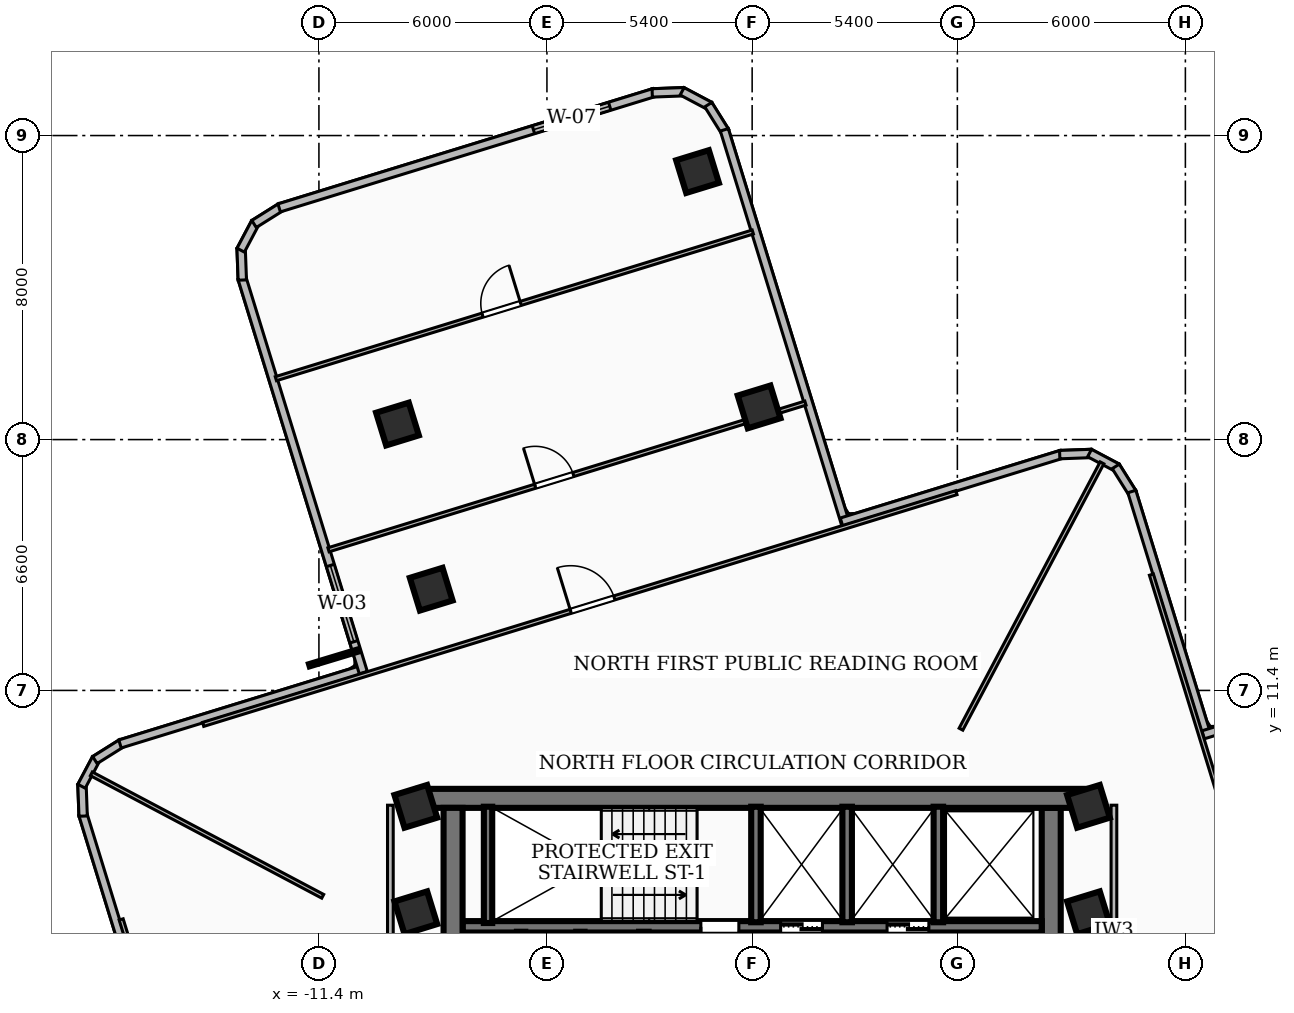
"""IFC4 building model, lengths in metres.
Left out: names, types, materials, properties, quantities, classifications, styles, units other than length and angle.
Written with IfcOpenShell. Run it as: python <this file> out.ifc"""

import sys

from ifc_helpers import new_model, si_unit, direction, frame, frame_2d, origin, origin_2d, place, context, subcontext, project, spatial, rectangle, extrude, element, fill, save


model = new_model("IFC4")
c1 = context("Model", 3, precision=1e-05, world=origin(), true_north=direction((0.0, 1.0)))
c2 = subcontext(c1, "Body", "Model", "MODEL_VIEW")
j1 = project(units=[si_unit("LENGTHUNIT", "METRE"), si_unit("PLANEANGLEUNIT", "RADIAN")], contexts=[c1])
p1 = place(None, origin())
s1 = spatial("IfcSite", under=j1, at=p1, CompositionType="ELEMENT")
p2 = place(p1, origin())
s2 = spatial("IfcBuilding", under=s1, at=p2, CompositionType="ELEMENT")
p3 = place(p2, frame((0.0, 0.0, 148.68)))
s3 = spatial("IfcBuildingStorey", under=s2, at=p3, CompositionType="ELEMENT", Elevation=148.68)
p4 = place(p3, frame((-8.78, 8.56, 0.0), z_axis=(0.0, 0.0, 1.0), x_axis=(1.0, 0.0, 0.0)))
e1 = element("IfcWall", 1, at=p4, inside=s3, PredefinedType="SHEAR", context=c2, shape_type="SweptSolid", body=[
    extrude(rectangle(XDim=17.56, YDim=0.5, at=frame_2d((8.78, 0.0))), origin(), (0.0, 0.0, 1.0), 3.32),
])
for number, where, z_axis, x_axis in (
    (2, (-7.87, 2.0, 0.0), (0.0, 0.0, 1.0), (0.0, 1.0, 0.0)),
    (3, (7.87, 8.31, 0.0), (0.0, 0.0, 1.0), (0.0, -1.0, 0.0)),
):
    element("IfcWall", number, at=place(p3, frame(where, z_axis=z_axis, x_axis=x_axis)), inside=s3, PredefinedType="SHEAR", context=c2, shape_type="SweptSolid", body=[
        extrude(rectangle(XDim=6.31, YDim=0.5, at=frame_2d((3.155, 0.0))), origin(), (0.0, 0.0, 1.0), 3.32),
    ])
p5 = place(p3, frame((7.62, 5.18, 0.0), z_axis=(0.0, 0.0, 1.0), x_axis=(-1.0, 0.0, 0.0)))
e4 = element("IfcWall", 4, at=p5, inside=s3, PredefinedType="SOLIDWALL", context=c2, shape_type="SweptSolid", body=[
    extrude(rectangle(XDim=15.24, YDim=0.3, at=frame_2d((7.62, 0.0))), origin(), (0.0, 0.0, 1.0), 3.32),
])
p6 = place(p5, frame((5.77, 0.0, 0.0)))
e5 = element("IfcOpeningElement", 5, at=p6, cuts=e4, PredefinedType="OPENING", context=c2, shape_type="SweptSolid", body=[
    extrude(rectangle(XDim=1.1, YDim=2.15, at=frame_2d((0.55, 1.075))), frame((0.0, 0.16, 0.0), z_axis=(0.0, -1.0, 0.0), x_axis=(1.0, 0.0, 0.0)), (0.0, 0.0, 1.0), 0.32),
])
p7 = place(p5, frame((2.97, 0.0, 0.0)))
e6 = element("IfcOpeningElement", 6, at=p7, cuts=e4, PredefinedType="OPENING", context=c2, shape_type="SweptSolid", body=[
    extrude(rectangle(XDim=1.1, YDim=2.15, at=frame_2d((0.55, 1.075))), frame((0.0, 0.16, 0.0), z_axis=(0.0, -1.0, 0.0), x_axis=(1.0, 0.0, 0.0)), (0.0, 0.0, 1.0), 0.32),
])
p8 = place(p5, frame((7.97, 0.0, 0.0)))
e7 = element("IfcOpeningElement", 7, at=p8, cuts=e4, PredefinedType="OPENING", context=c2, shape_type="SweptSolid", body=[
    extrude(rectangle(XDim=1.0, YDim=2.1, at=frame_2d((0.5, 1.05))), frame((0.0, 0.16, 0.0), z_axis=(0.0, -1.0, 0.0), x_axis=(1.0, 0.0, 0.0)), (0.0, 0.0, 1.0), 0.32),
])
p9 = place(p3, frame((-6.95, 5.28, 0.0), z_axis=(0.0, 0.0, 1.0), x_axis=(0.0, 1.0, 0.0)))
e8 = element("IfcWall", 8, at=p9, inside=s3, PredefinedType="SOLIDWALL", context=c2, shape_type="SweptSolid", body=[
    extrude(rectangle(XDim=3.06, YDim=0.22, at=frame_2d((1.53, 0.0))), origin(), (0.0, 0.0, 1.0), 3.32),
])
for number, where, z_axis, x_axis in (
    (9, (0.1, 5.3, 0.0), (0.0, 0.0, 1.0), (0.0, 1.0, 0.0)),
    (10, (2.5, 5.3, 0.0), (0.0, 0.0, 1.0), (0.0, 1.0, 0.0)),
    (11, (4.9, 5.3, 0.0), (0.0, 0.0, 1.0), (0.0, 1.0, 0.0)),
):
    element("IfcWall", number, at=place(p3, frame(where, z_axis=z_axis, x_axis=x_axis)), inside=s3, PredefinedType="SOLIDWALL", context=c2, shape_type="SweptSolid", body=[
        extrude(rectangle(XDim=3.04, YDim=0.25, at=frame_2d((1.52, 0.0))), origin(), (0.0, 0.0, 1.0), 3.32),
    ])
p10 = place(p3, frame((-2.85, 1.98, 0.0), z_axis=(0.0, 0.0, 1.0), x_axis=(0.0, 1.0, 0.0)))
e12 = element("IfcWall", 12, at=p10, inside=s3, PredefinedType="SOLIDWALL", context=c2, shape_type="SweptSolid", body=[
    extrude(rectangle(XDim=3.07, YDim=0.25, at=frame_2d((1.535, 0.0))), origin(), (0.0, 0.0, 1.0), 3.32),
])
for number, where, z_axis, x_axis in (
    (13, (-6.08, 1.98, 0.0), (0.0, 0.0, 1.0), (0.0, 1.0, 0.0)),
    (14, (-4.52, 1.98, 0.0), (0.0, 0.0, 1.0), (0.0, 1.0, 0.0)),
):
    element("IfcWall", number, at=place(p3, frame(where, z_axis=z_axis, x_axis=x_axis)), inside=s3, PredefinedType="SOLIDWALL", context=c2, shape_type="SweptSolid", body=[
        extrude(rectangle(XDim=3.07, YDim=0.22, at=frame_2d((1.535, 0.0))), origin(), (0.0, 0.0, 1.0), 3.32),
    ])
for number, where, z_axis, x_axis in (
    (15, (-8.85, 5.55, 0.0), (0.0, 0.0, 1.0), (0.956, 0.294, 0.0)),
    (16, (8.85, 5.55, 0.0), (0.0, 0.0, 1.0), (0.956, 0.294, 0.0)),
    (17, (-8.85, 8.35, 0.0), (0.0, 0.0, 1.0), (0.956, 0.294, 0.0)),
    (18, (8.85, 8.35, 0.0), (0.0, 0.0, 1.0), (0.956, 0.294, 0.0)),
    (19, (0.183, 18.86, 0.0), (0.0, 0.0, 1.0), (0.956, 0.294, 0.0)),
    (20, (-8.445, 14.064, 0.0), (0.0, 0.0, 1.0), (0.956, 0.294, 0.0)),
    (21, (-1.437, 25.052, 0.0), (0.0, 0.0, 1.0), (0.956, 0.294, 0.0)),
    (22, (-9.333, 18.409, 0.0), (0.0, 0.0, 1.0), (0.956, 0.294, 0.0)),
):
    element("IfcColumn", number, at=place(p3, frame(where, z_axis=z_axis, x_axis=x_axis)), inside=s3, PredefinedType="COLUMN", context=c2, shape_type="SweptSolid", body=[
        extrude(rectangle(XDim=0.9, YDim=0.9, at=origin_2d()), origin(), (0.0, 0.0, 1.0), 3.6),
    ])
p11 = place(p3, frame((-15.831, 2.351, 0.0), z_axis=(0.0, 0.0, 1.0), x_axis=(-0.293958424126, 0.955818207028, 0.0)))
e23 = element("IfcWall", 23, at=p11, inside=s3, PredefinedType="SOLIDWALL", context=c2, shape_type="SweptSolid", body=[
    extrude(rectangle(XDim=6.059, YDim=0.22, at=frame_2d((3.029, 0.0))), origin(), (0.0, 0.0, 1.0), 3.32),
])
p12 = place(p3, frame((-17.604, 8.093, 0.0), z_axis=(0.0, 0.0, 1.0), x_axis=(-0.037195813461, 0.999307996296, 0.0)))
e24 = element("IfcWall", 24, at=p12, inside=s3, PredefinedType="SOLIDWALL", context=c2, shape_type="SweptSolid", body=[
    extrude(rectangle(XDim=0.833, YDim=0.22, at=frame_2d((0.417, 0.0))), origin(), (0.0, 0.0, 1.0), 3.32),
])
p13 = place(p3, frame((-17.646, 8.879, 0.0), z_axis=(0.0, 0.0, 1.0), x_axis=(0.46853080902, 0.883447158012, 0.0)))
e25 = element("IfcWall", 25, at=p13, inside=s3, PredefinedType="SOLIDWALL", context=c2, shape_type="SweptSolid", body=[
    extrude(rectangle(XDim=0.82, YDim=0.22, at=frame_2d((0.41, 0.0))), origin(), (0.0, 0.0, 1.0), 3.32),
])
p14 = place(p3, frame((-17.295, 9.568, 0.0), z_axis=(0.0, 0.0, 1.0), x_axis=(0.847058721529, 0.531499315411, 0.0)))
e26 = element("IfcWall", 26, at=p14, inside=s3, PredefinedType="SOLIDWALL", context=c2, shape_type="SweptSolid", body=[
    extrude(rectangle(XDim=0.833, YDim=0.22, at=frame_2d((0.417, 0.0))), origin(), (0.0, 0.0, 1.0), 3.32),
])
p15 = place(p3, frame((-16.634, 9.991, 0.0), z_axis=(0.0, 0.0, 1.0), x_axis=(0.955804779036, 0.294002082259, 0.0)))
e27 = element("IfcWall", 27, at=p15, inside=s3, PredefinedType="SOLIDWALL", context=c2, shape_type="SweptSolid", body=[
    extrude(rectangle(XDim=6.759, YDim=0.22, at=frame_2d((3.379, 0.0))), origin(), (0.0, 0.0, 1.0), 3.32),
])
p16 = place(p3, frame((-10.232, 11.868, 0.0), z_axis=(0.0, 0.0, 1.0), x_axis=(-0.293964195622, 0.955816432006, 0.0)))
e28 = element("IfcWall", 28, at=p16, inside=s3, PredefinedType="SOLIDWALL", context=c2, shape_type="SweptSolid", body=[
    extrude(rectangle(XDim=10.859, YDim=0.22, at=frame_2d((5.429, 0.0))), origin(), (0.0, 0.0, 1.0), 3.32),
])
p17 = place(p16, frame((0.85, 0.0, 0.85)))
e29 = element("IfcOpeningElement", 29, at=p17, cuts=e28, PredefinedType="OPENING", context=c2, shape_type="SweptSolid", body=[
    extrude(rectangle(XDim=2.1, YDim=2.0, at=frame_2d((1.05, 1.0))), frame((0.0, 0.12, 0.0), z_axis=(0.0, -1.0, 0.0), x_axis=(1.0, 0.0, 0.0)), (0.0, 0.0, 1.0), 0.24),
])
p18 = place(p3, frame((-13.416, 22.198, 0.0), z_axis=(0.0, 0.0, 1.0), x_axis=(-0.037195813461, 0.999307996296, 0.0)))
e30 = element("IfcWall", 30, at=p18, inside=s3, PredefinedType="SOLIDWALL", context=c2, shape_type="SweptSolid", body=[
    extrude(rectangle(XDim=0.833, YDim=0.22, at=frame_2d((0.417, 0.0))), origin(), (0.0, 0.0, 1.0), 3.32),
])
p19 = place(p3, frame((-13.458, 22.984, 0.0), z_axis=(0.0, 0.0, 1.0), x_axis=(0.46853080902, 0.883447158012, 0.0)))
e31 = element("IfcWall", 31, at=p19, inside=s3, PredefinedType="SOLIDWALL", context=c2, shape_type="SweptSolid", body=[
    extrude(rectangle(XDim=0.82, YDim=0.22, at=frame_2d((0.41, 0.0))), origin(), (0.0, 0.0, 1.0), 3.32),
])
p20 = place(p3, frame((-13.107, 23.673, 0.0), z_axis=(0.0, 0.0, 1.0), x_axis=(0.847141460322, 0.531367430506, 0.0)))
e32 = element("IfcWall", 32, at=p20, inside=s3, PredefinedType="SOLIDWALL", context=c2, shape_type="SweptSolid", body=[
    extrude(rectangle(XDim=0.833, YDim=0.22, at=frame_2d((0.417, 0.0))), origin(), (0.0, 0.0, 1.0), 3.32),
])
p21 = place(p3, frame((-12.446, 24.096, 0.0), z_axis=(0.0, 0.0, 1.0), x_axis=(0.955818382151, 0.293957854703, 0.0)))
e33 = element("IfcWall", 33, at=p21, inside=s3, PredefinedType="SOLIDWALL", context=c2, shape_type="SweptSolid", body=[
    extrude(rectangle(XDim=10.321, YDim=0.22, at=frame_2d((5.161, 0.0))), origin(), (0.0, 0.0, 1.0), 3.32),
])
p22 = place(p21, frame((7.0, 0.0, 0.85)))
e34 = element("IfcOpeningElement", 34, at=p22, cuts=e33, PredefinedType="OPENING", context=c2, shape_type="SweptSolid", body=[
    extrude(rectangle(XDim=2.1, YDim=1.8, at=frame_2d((1.05, 0.9))), frame((0.0, 0.12, 0.0), z_axis=(0.0, -1.0, 0.0), x_axis=(1.0, 0.0, 0.0)), (0.0, 0.0, 1.0), 0.24),
])
p23 = place(p3, frame((-2.63, 27.122, 0.0), z_axis=(0.0, 0.0, 1.0), x_axis=(0.999309614288, 0.037152318798, 0.0)))
e35 = element("IfcWall", 35, at=p23, inside=s3, PredefinedType="SOLIDWALL", context=c2, shape_type="SweptSolid", body=[
    extrude(rectangle(XDim=0.834, YDim=0.22, at=frame_2d((0.417, 0.0))), origin(), (0.0, 0.0, 1.0), 3.32),
])
p24 = place(p3, frame((-1.843, 27.164, 0.0), z_axis=(0.0, 0.0, 1.0), x_axis=(0.883447158012, -0.46853080902, 0.0)))
e36 = element("IfcWall", 36, at=p24, inside=s3, PredefinedType="SOLIDWALL", context=c2, shape_type="SweptSolid", body=[
    extrude(rectangle(XDim=0.82, YDim=0.22, at=frame_2d((0.41, 0.0))), origin(), (0.0, 0.0, 1.0), 3.32),
])
p25 = place(p3, frame((-1.154, 26.813, 0.0), z_axis=(0.0, 0.0, 1.0), x_axis=(0.530209456091, -0.847866695107, 0.0)))
e37 = element("IfcWall", 37, at=p25, inside=s3, PredefinedType="SOLIDWALL", context=c2, shape_type="SweptSolid", body=[
    extrude(rectangle(XDim=0.834, YDim=0.22, at=frame_2d((0.417, 0.0))), origin(), (0.0, 0.0, 1.0), 3.32),
])
p26 = place(p3, frame((-0.732, 26.151, 0.0), z_axis=(0.0, 0.0, 1.0), x_axis=(0.294057408358, -0.955787759175, 0.0)))
e38 = element("IfcWall", 38, at=p26, inside=s3, PredefinedType="SOLIDWALL", context=c2, shape_type="SweptSolid", body=[
    extrude(rectangle(XDim=10.858, YDim=0.22, at=frame_2d((5.429, 0.0))), origin(), (0.0, 0.0, 1.0), 2.55),
])
p27 = place(p3, frame((2.351, 15.831, 0.0), z_axis=(0.0, 0.0, 1.0), x_axis=(0.955818207028, 0.293958424126, 0.0)))
e39 = element("IfcWall", 39, at=p27, inside=s3, PredefinedType="SOLIDWALL", context=c2, shape_type="SweptSolid", body=[
    extrude(rectangle(XDim=6.059, YDim=0.22, at=frame_2d((3.029, 0.0))), origin(), (0.0, 0.0, 1.0), 2.55),
])
p28 = place(p3, frame((8.093, 17.604, 0.0), z_axis=(0.0, 0.0, 1.0), x_axis=(0.999307996296, 0.037195813461, 0.0)))
e40 = element("IfcWall", 40, at=p28, inside=s3, PredefinedType="SOLIDWALL", context=c2, shape_type="SweptSolid", body=[
    extrude(rectangle(XDim=0.833, YDim=0.22, at=frame_2d((0.417, 0.0))), origin(), (0.0, 0.0, 1.0), 3.32),
])
p29 = place(p3, frame((8.879, 17.646, 0.0), z_axis=(0.0, 0.0, 1.0), x_axis=(0.883447158012, -0.46853080902, 0.0)))
e41 = element("IfcWall", 41, at=p29, inside=s3, PredefinedType="SOLIDWALL", context=c2, shape_type="SweptSolid", body=[
    extrude(rectangle(XDim=0.82, YDim=0.22, at=frame_2d((0.41, 0.0))), origin(), (0.0, 0.0, 1.0), 3.32),
])
p30 = place(p3, frame((9.568, 17.295, 0.0), z_axis=(0.0, 0.0, 1.0), x_axis=(0.531499315411, -0.847058721529, 0.0)))
e42 = element("IfcWall", 42, at=p30, inside=s3, PredefinedType="SOLIDWALL", context=c2, shape_type="SweptSolid", body=[
    extrude(rectangle(XDim=0.833, YDim=0.22, at=frame_2d((0.417, 0.0))), origin(), (0.0, 0.0, 1.0), 3.32),
])
p31 = place(p3, frame((9.991, 16.634, 0.0), z_axis=(0.0, 0.0, 1.0), x_axis=(0.294002082259, -0.955804779036, 0.0)))
e43 = element("IfcWall", 43, at=p31, inside=s3, PredefinedType="SOLIDWALL", context=c2, shape_type="SweptSolid", body=[
    extrude(rectangle(XDim=6.759, YDim=0.22, at=frame_2d((3.379, 0.0))), origin(), (0.0, 0.0, 1.0), 3.32),
])
p32 = place(p3, frame((11.868, 10.232, 0.0), z_axis=(0.0, 0.0, 1.0), x_axis=(0.955802538335, 0.29400936671, 0.0)))
e44 = element("IfcWall", 44, at=p32, inside=s3, PredefinedType="SOLIDWALL", context=c2, shape_type="SweptSolid", body=[
    extrude(rectangle(XDim=13.459, YDim=0.22, at=frame_2d((6.729, 0.0))), origin(), (0.0, 0.0, 1.0), 3.32),
])
p33 = place(p32, frame((10.259, 0.0, 0.85)))
e45 = element("IfcOpeningElement", 45, at=p33, cuts=e44, PredefinedType="OPENING", context=c2, shape_type="SweptSolid", body=[
    extrude(rectangle(XDim=2.1, YDim=1.8, at=frame_2d((1.05, 0.9))), frame((0.0, 0.12, 0.0), z_axis=(0.0, -1.0, 0.0), x_axis=(1.0, 0.0, 0.0)), (0.0, 0.0, 1.0), 0.24),
])
for number, where, z_axis, x_axis in (
    (46, (-9.52, 1.75, 0.0), (0.0, 0.0, 1.0), (0.0, 1.0, 0.0)),
    (47, (9.52, 1.75, 0.0), (0.0, 0.0, 1.0), (0.0, 1.0, 0.0)),
):
    element("IfcWall", number, at=place(p3, frame(where, z_axis=z_axis, x_axis=x_axis)), inside=s3, PredefinedType="PARTITIONING", context=c2, shape_type="SweptSolid", body=[
        extrude(rectangle(XDim=6.63, YDim=0.15, at=frame_2d((3.315, 0.0))), origin(), (0.0, 0.0, 1.0), 2.55),
    ])
p34 = place(p3, frame((5.495, 10.38, 0.0), z_axis=(0.0, 0.0, 1.0), x_axis=(0.467965518706, 0.883746724635, 0.0)))
e48 = element("IfcWall", 48, at=p34, inside=s3, PredefinedType="PARTITIONING", context=c2, shape_type="SweptSolid", body=[
    extrude(rectangle(XDim=7.93, YDim=0.11, at=frame_2d((3.965, 0.0))), origin(), (0.0, 0.0, 1.0), 2.55),
])
p35 = place(p3, frame((-11.3, 5.983, 0.0), z_axis=(0.0, 0.0, 1.0), x_axis=(-0.883779295194, 0.467904004457, 0.0)))
e49 = element("IfcWall", 49, at=p35, inside=s3, PredefinedType="PARTITIONING", context=c2, shape_type="SweptSolid", body=[
    extrude(rectangle(XDim=6.888, YDim=0.11, at=frame_2d((3.444, 0.0))), origin(), (0.0, 0.0, 1.0), 3.32),
])
p36 = place(p3, frame((10.506, 14.447, 0.0), z_axis=(0.0, 0.0, 1.0), x_axis=(0.294033732643, -0.955795042919, 0.0)))
e50 = element("IfcWall", 50, at=p36, inside=s3, PredefinedType="PARTITIONING", context=c2, shape_type="SweptSolid", body=[
    extrude(rectangle(XDim=20.739, YDim=0.11, at=frame_2d((10.369, 0.0))), origin(), (0.0, 0.0, 1.0), 2.55),
])
p37 = place(p36, frame((10.12, 0.0, 0.0)))
e51 = element("IfcOpeningElement", 51, at=p37, cuts=e50, PredefinedType="OPENING", context=c2, shape_type="SweptSolid", body=[
    extrude(rectangle(XDim=1.2, YDim=2.1, at=frame_2d((0.6, 1.05))), frame((0.0, 0.065, 0.0), z_axis=(0.0, -1.0, 0.0), x_axis=(1.0, 0.0, 0.0)), (0.0, 0.0, 1.0), 0.13),
])
p38 = place(p3, frame((-14.447, 10.506, 0.0), z_axis=(0.0, 0.0, 1.0), x_axis=(0.955795042919, 0.294033732643, 0.0)))
e52 = element("IfcWall", 52, at=p38, inside=s3, PredefinedType="PARTITIONING", context=c2, shape_type="SweptSolid", body=[
    extrude(rectangle(XDim=20.739, YDim=0.11, at=frame_2d((10.369, 0.0))), origin(), (0.0, 0.0, 1.0), 2.55),
])
p39 = place(p38, frame((10.12, 0.0, 0.0)))
e53 = element("IfcOpeningElement", 53, at=p39, cuts=e52, PredefinedType="OPENING", context=c2, shape_type="SweptSolid", body=[
    extrude(rectangle(XDim=1.2, YDim=2.1, at=frame_2d((0.6, 1.05))), frame((0.0, 0.065, 0.0), z_axis=(0.0, -1.0, 0.0), x_axis=(1.0, 0.0, 0.0)), (0.0, 0.0, 1.0), 0.13),
])
p40 = place(p3, frame((-11.148, 15.1, 0.0), z_axis=(0.0, 0.0, 1.0), x_axis=(0.955815184052, 0.29396825328, 0.0)))
e54 = element("IfcWall", 54, at=p40, inside=s3, PredefinedType="PARTITIONING", context=c2, shape_type="SweptSolid", body=[
    extrude(rectangle(XDim=13.13, YDim=0.11, at=frame_2d((6.565, 0.0))), origin(), (0.0, 0.0, 1.0), 2.55),
])
p41 = place(p40, frame((5.69, 0.0, 0.0)))
e55 = element("IfcOpeningElement", 55, at=p41, cuts=e54, PredefinedType="OPENING", context=c2, shape_type="SweptSolid", body=[
    extrude(rectangle(XDim=1.05, YDim=2.08, at=frame_2d((0.525, 1.04))), frame((0.0, 0.065, 0.0), z_axis=(0.0, -1.0, 0.0), x_axis=(1.0, 0.0, 0.0)), (0.0, 0.0, 1.0), 0.13),
])
p42 = place(p3, frame((-12.533, 19.602, 0.0), z_axis=(0.0, 0.0, 1.0), x_axis=(0.955815184052, 0.29396825328, 0.0)))
e56 = element("IfcWall", 56, at=p42, inside=s3, PredefinedType="PARTITIONING", context=c2, shape_type="SweptSolid", body=[
    extrude(rectangle(XDim=13.13, YDim=0.11, at=frame_2d((6.565, 0.0))), origin(), (0.0, 0.0, 1.0), 2.55),
])
p43 = place(p42, frame((5.69, 0.0, 0.0)))
e57 = element("IfcOpeningElement", 57, at=p43, cuts=e56, PredefinedType="OPENING", context=c2, shape_type="SweptSolid", body=[
    extrude(rectangle(XDim=1.05, YDim=2.08, at=frame_2d((0.525, 1.04))), frame((0.0, 0.065, 0.0), z_axis=(0.0, -1.0, 0.0), x_axis=(1.0, 0.0, 0.0)), (0.0, 0.0, 1.0), 0.13),
])
p44 = place(p3, frame((-10.506, -14.447, 0.0), z_axis=(0.0, 0.0, 1.0), x_axis=(-0.294033732643, 0.955795042919, 0.0)))
e58 = element("IfcWall", 58, at=p44, inside=s3, PredefinedType="PARTITIONING", context=c2, shape_type="SweptSolid", body=[
    extrude(rectangle(XDim=20.739, YDim=0.11, at=frame_2d((10.369, 0.0))), origin(), (0.0, 0.0, 1.0), 2.55),
])
p45 = place(p44, frame((10.12, 0.0, 0.0)))
e59 = element("IfcOpeningElement", 59, at=p45, cuts=e58, PredefinedType="OPENING", context=c2, shape_type="SweptSolid", body=[
    extrude(rectangle(XDim=1.2, YDim=2.1, at=frame_2d((0.6, 1.05))), frame((0.0, 0.065, 0.0), z_axis=(0.0, -1.0, 0.0), x_axis=(1.0, 0.0, 0.0)), (0.0, 0.0, 1.0), 0.13),
])
p46 = place(p17, origin())
e60 = element("IfcWindow", 60, at=p46, inside=s3, PartitioningType="SINGLE_PANEL", PredefinedType="WINDOW", context=c2, shape_type="SweptSolid", body=[
    extrude(rectangle(XDim=2.1, YDim=2.0, at=frame_2d((1.05, 1.0))), frame((0.0, 0.03, 0.0), z_axis=(0.0, -1.0, 0.0), x_axis=(1.0, 0.0, 0.0)), (0.0, 0.0, 1.0), 0.06),
])
fill(e29, e60)
p47 = place(p22, origin())
e61 = element("IfcWindow", 61, at=p47, inside=s3, PartitioningType="SINGLE_PANEL", PredefinedType="WINDOW", context=c2, shape_type="SweptSolid", body=[
    extrude(rectangle(XDim=2.1, YDim=1.8, at=frame_2d((1.05, 0.9))), frame((0.0, 0.03, 0.0), z_axis=(0.0, -1.0, 0.0), x_axis=(1.0, 0.0, 0.0)), (0.0, 0.0, 1.0), 0.06),
])
fill(e34, e61)
p48 = place(p6, origin())
e62 = element("IfcDoor", 62, at=p48, inside=s3, OperationType="DOUBLE_DOOR_SLIDING", PredefinedType="DOOR", context=c2, shape_type="SweptSolid", body=[
    extrude(rectangle(XDim=1.1, YDim=2.15, at=frame_2d((0.55, 1.075))), frame((0.0, 0.025, 0.0), z_axis=(0.0, -1.0, 0.0), x_axis=(1.0, 0.0, 0.0)), (0.0, 0.0, 1.0), 0.05),
])
fill(e5, e62)
p49 = place(p7, origin())
e63 = element("IfcDoor", 63, at=p49, inside=s3, OperationType="DOUBLE_DOOR_SLIDING", PredefinedType="DOOR", context=c2, shape_type="SweptSolid", body=[
    extrude(rectangle(XDim=1.1, YDim=2.15, at=frame_2d((0.55, 1.075))), frame((0.0, 0.025, 0.0), z_axis=(0.0, -1.0, 0.0), x_axis=(1.0, 0.0, 0.0)), (0.0, 0.0, 1.0), 0.05),
])
fill(e6, e63)
p50 = place(p8, origin())
e64 = element("IfcDoor", 64, at=p50, inside=s3, OperationType="SINGLE_SWING_RIGHT", PredefinedType="DOOR", context=c2, shape_type="SweptSolid", body=[
    extrude(rectangle(XDim=1.0, YDim=2.1, at=frame_2d((0.5, 1.05))), frame((0.0, 0.025, 0.0), z_axis=(0.0, -1.0, 0.0), x_axis=(1.0, 0.0, 0.0)), (0.0, 0.0, 1.0), 0.05),
])
fill(e7, e64)
p51 = place(p39, origin())
e65 = element("IfcDoor", 65, at=p51, inside=s3, OperationType="SINGLE_SWING_LEFT", PredefinedType="DOOR", context=c2, shape_type="SweptSolid", body=[
    extrude(rectangle(XDim=1.2, YDim=2.1, at=frame_2d((0.6, 1.05))), frame((0.0, 0.025, 0.0), z_axis=(0.0, -1.0, 0.0), x_axis=(1.0, 0.0, 0.0)), (0.0, 0.0, 1.0), 0.05),
])
fill(e53, e65)
p52 = place(p41, origin())
e66 = element("IfcDoor", 66, at=p52, inside=s3, OperationType="SINGLE_SWING_LEFT", PredefinedType="DOOR", context=c2, shape_type="SweptSolid", body=[
    extrude(rectangle(XDim=1.05, YDim=2.08, at=frame_2d((0.525, 1.04))), frame((0.0, 0.025, 0.0), z_axis=(0.0, -1.0, 0.0), x_axis=(1.0, 0.0, 0.0)), (0.0, 0.0, 1.0), 0.05),
])
fill(e55, e66)
p53 = place(p43, origin())
e67 = element("IfcDoor", 67, at=p53, inside=s3, OperationType="SINGLE_SWING_RIGHT", PredefinedType="DOOR", context=c2, shape_type="SweptSolid", body=[
    extrude(rectangle(XDim=1.05, YDim=2.08, at=frame_2d((0.525, 1.04))), frame((0.0, 0.025, 0.0), z_axis=(0.0, -1.0, 0.0), x_axis=(1.0, 0.0, 0.0)), (0.0, 0.0, 1.0), 0.05),
])
fill(e57, e67)
save(model, sys.argv[1])
